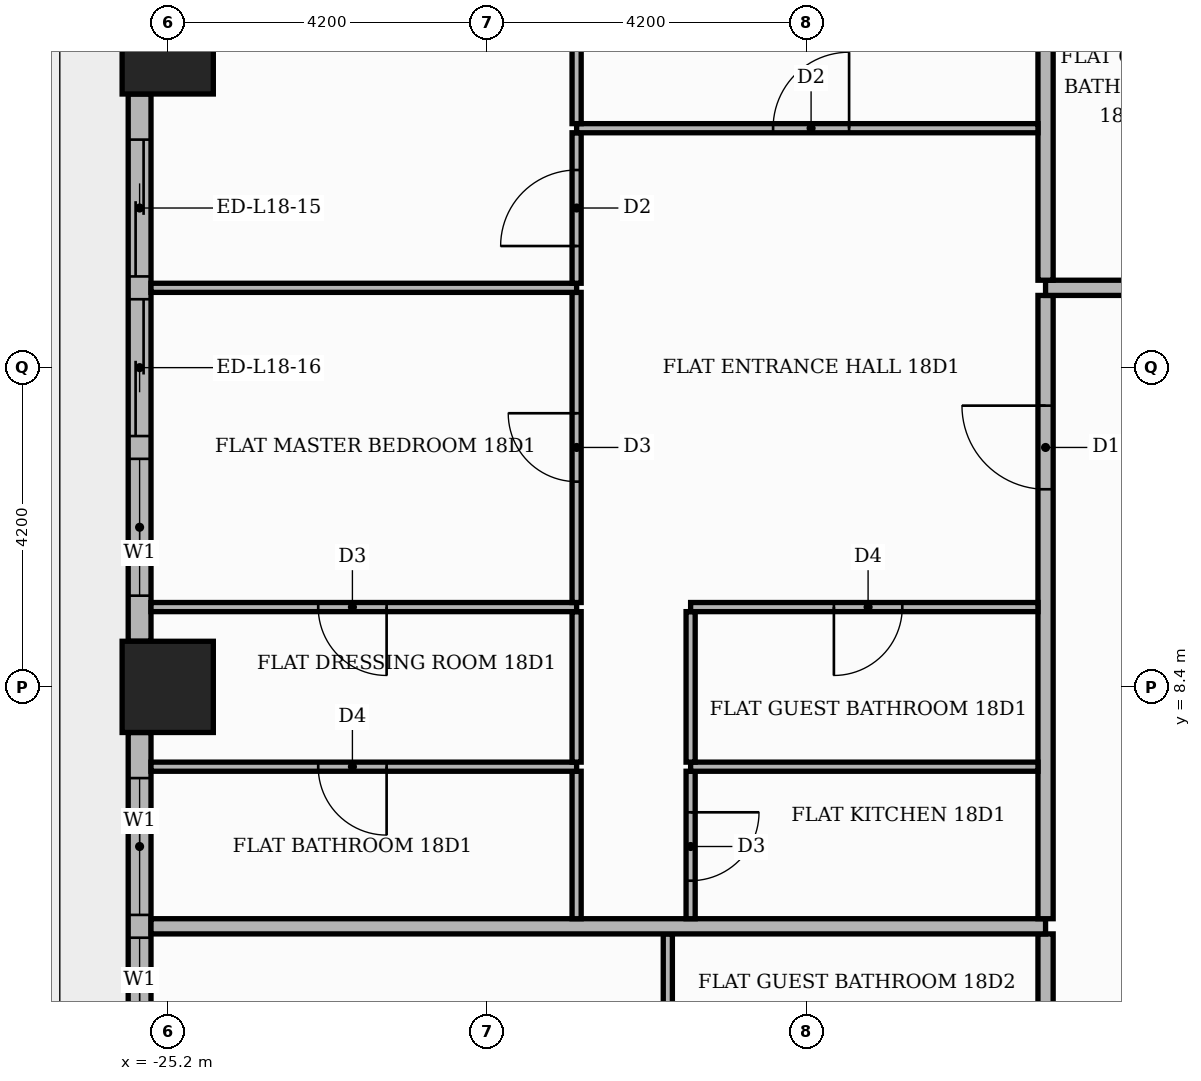
"""IFC4 building model, lengths in metres.
Left out: names, types, materials, properties, quantities, classifications, styles, units other than length and angle.
Written with IfcOpenShell. Run it as: python <this file> out.ifc"""

import sys

from ifc_helpers import new_model, si_unit, direction, frame, frame_2d, origin, origin_2d, place, context, subcontext, project, spatial, rectangle, extrude, element, fill, save


model = new_model("IFC4")
c1 = context("Model", 3, precision=1e-05, world=origin(), true_north=direction((0.0, 1.0)))
c2 = subcontext(c1, "Body", "Model", "MODEL_VIEW")
j1 = project(units=[si_unit("LENGTHUNIT", "METRE"), si_unit("PLANEANGLEUNIT", "RADIAN")], contexts=[c1])
p1 = place(None, origin())
s1 = spatial("IfcSite", under=j1, at=p1, CompositionType="ELEMENT")
p2 = place(p1, origin())
s2 = spatial("IfcBuilding", under=s1, at=p2, CompositionType="ELEMENT")
p3 = place(p2, frame((0.0, 0.0, 79.2)))
s3 = spatial("IfcBuildingStorey", under=s2, at=p3, CompositionType="ELEMENT", Elevation=79.2)
for number, where, z_axis, x_axis in (
    (1, (-25.2, 8.4, 0.0), (0.0, 0.0, 1.0), (1.0, 0.0, 0.0)),
    (2, (-25.2, 16.8, 0.0), (0.0, 0.0, 1.0), (1.0, 0.0, 0.0)),
):
    element("IfcColumn", number, at=place(p3, frame(where, z_axis=z_axis, x_axis=x_axis)), inside=s3, PredefinedType="COLUMN", context=c2, shape_type="SweptSolid", body=[
        extrude(rectangle(XDim=1.2, YDim=1.2, at=origin_2d()), origin(), (0.0, 0.0, 1.0), 3.9),
    ])
p4 = place(p3, frame((-25.57, 16.2, 0.0), z_axis=(0.0, 0.0, 1.0), x_axis=(0.0, -1.0, 0.0)))
e3 = element("IfcWall", 3, at=p4, inside=s3, PredefinedType="STANDARD", context=c2, shape_type="SweptSolid", body=[
    extrude(rectangle(XDim=7.2, YDim=0.3, at=frame_2d((3.6, 0.0))), origin(), (0.0, 0.0, 1.0), 3.48),
])
p5 = place(p4, frame((0.6, 0.0, 0.0)))
e4 = element("IfcOpeningElement", 4, at=p5, cuts=e3, PredefinedType="OPENING", context=c2, shape_type="SweptSolid", body=[
    extrude(rectangle(XDim=1.8, YDim=2.4, at=frame_2d((0.9, 1.2))), frame((0.0, 0.16, 0.0), z_axis=(0.0, -1.0, 0.0), x_axis=(1.0, 0.0, 0.0)), (0.0, 0.0, 1.0), 0.32),
])
p6 = place(p4, frame((2.7, 0.0, 0.0)))
e5 = element("IfcOpeningElement", 5, at=p6, cuts=e3, PredefinedType="OPENING", context=c2, shape_type="SweptSolid", body=[
    extrude(rectangle(XDim=1.8, YDim=2.4, at=frame_2d((0.9, 1.2))), frame((0.0, 0.16, 0.0), z_axis=(0.0, -1.0, 0.0), x_axis=(1.0, 0.0, 0.0)), (0.0, 0.0, 1.0), 0.32),
])
p7 = place(p4, frame((4.8, 0.0, 0.9)))
e6 = element("IfcOpeningElement", 6, at=p7, cuts=e3, PredefinedType="OPENING", context=c2, shape_type="SweptSolid", body=[
    extrude(rectangle(XDim=1.8, YDim=2.1, at=frame_2d((0.9, 1.05))), frame((0.0, 0.16, 0.0), z_axis=(0.0, -1.0, 0.0), x_axis=(1.0, 0.0, 0.0)), (0.0, 0.0, 1.0), 0.32),
])
p8 = place(p3, frame((-25.57, 7.8, 0.0), z_axis=(0.0, 0.0, 1.0), x_axis=(0.0, -1.0, 0.0)))
e7 = element("IfcWall", 7, at=p8, inside=s3, PredefinedType="STANDARD", context=c2, shape_type="SweptSolid", body=[
    extrude(rectangle(XDim=4.65, YDim=0.3, at=frame_2d((2.325, 0.0))), origin(), (0.0, 0.0, 1.0), 3.48),
])
p9 = place(p8, frame((0.6, 0.0, 0.9)))
e8 = element("IfcOpeningElement", 8, at=p9, cuts=e7, PredefinedType="OPENING", context=c2, shape_type="SweptSolid", body=[
    extrude(rectangle(XDim=1.8, YDim=2.1, at=frame_2d((0.9, 1.05))), frame((0.0, 0.16, 0.0), z_axis=(0.0, -1.0, 0.0), x_axis=(1.0, 0.0, 0.0)), (0.0, 0.0, 1.0), 0.32),
])
p10 = place(p8, frame((2.7, 0.0, 0.9)))
e9 = element("IfcOpeningElement", 9, at=p10, cuts=e7, PredefinedType="OPENING", context=c2, shape_type="SweptSolid", body=[
    extrude(rectangle(XDim=1.8, YDim=2.1, at=frame_2d((0.9, 1.05))), frame((0.0, 0.16, 0.0), z_axis=(0.0, -1.0, 0.0), x_axis=(1.0, 0.0, 0.0)), (0.0, 0.0, 1.0), 0.32),
])
p11 = place(p3, frame((-13.65, -13.55, 0.0), z_axis=(0.0, 0.0, 1.0), x_axis=(0.0, 1.0, 0.0)))
e10 = element("IfcWall", 10, at=p11, inside=s3, PredefinedType="PARTITIONING", context=c2, shape_type="SweptSolid", body=[
    extrude(rectangle(XDim=18.7, YDim=0.2, at=frame_2d((9.35, 0.0))), origin(), (0.0, 0.0, 1.0), 3.48),
])
p12 = place(p11, frame((14.05, 0.0, 0.0)))
e11 = element("IfcOpeningElement", 11, at=p12, cuts=e10, PredefinedType="OPENING", context=c2, shape_type="SweptSolid", body=[
    extrude(rectangle(XDim=1.1, YDim=2.4, at=frame_2d((0.55, 1.2))), frame((0.0, 0.11, 0.0), z_axis=(0.0, -1.0, 0.0), x_axis=(1.0, 0.0, 0.0)), (0.0, 0.0, 1.0), 0.22),
])
p13 = place(p3, frame((-18.62, 3.21, 0.0), z_axis=(0.0, 0.0, 1.0), x_axis=(0.0, 1.0, 0.0)))
e12 = element("IfcWall", 12, at=p13, inside=s3, PredefinedType="PARTITIONING", context=c2, shape_type="SweptSolid", body=[
    extrude(rectangle(XDim=1.94, YDim=0.12, at=frame_2d((0.97, 0.0))), origin(), (0.0, 0.0, 1.0), 3.48),
])
p14 = place(p3, frame((-25.42, 5.25, 0.0), z_axis=(0.0, 0.0, 1.0), x_axis=(1.0, 0.0, 0.0)))
e13 = element("IfcWall", 13, at=p14, inside=s3, PredefinedType="PARTITIONING", context=c2, shape_type="SweptSolid", body=[
    extrude(rectangle(XDim=11.77, YDim=0.2, at=frame_2d((5.885, 0.0))), origin(), (0.0, 0.0, 1.0), 3.48),
])
p15 = place(p3, frame((-19.82, 5.35, 0.0), z_axis=(0.0, 0.0, 1.0), x_axis=(0.0, 1.0, 0.0)))
e14 = element("IfcWall", 14, at=p15, inside=s3, PredefinedType="PARTITIONING", context=c2, shape_type="SweptSolid", body=[
    extrude(rectangle(XDim=1.94, YDim=0.12, at=frame_2d((0.97, 0.0))), origin(), (0.0, 0.0, 1.0), 3.48),
])
p16 = place(p3, frame((-18.32, 5.35, 0.0), z_axis=(0.0, 0.0, 1.0), x_axis=(0.0, 1.0, 0.0)))
e15 = element("IfcWall", 15, at=p16, inside=s3, PredefinedType="PARTITIONING", context=c2, shape_type="SweptSolid", body=[
    extrude(rectangle(XDim=1.94, YDim=0.12, at=frame_2d((0.97, 0.0))), origin(), (0.0, 0.0, 1.0), 3.48),
])
p17 = place(p16, frame((0.5, 0.0, 0.0)))
e16 = element("IfcOpeningElement", 16, at=p17, cuts=e15, PredefinedType="OPENING", context=c2, shape_type="SweptSolid", body=[
    extrude(rectangle(XDim=0.9, YDim=2.1, at=frame_2d((0.45, 1.05))), frame((0.0, 0.07, 0.0), z_axis=(0.0, -1.0, 0.0), x_axis=(1.0, 0.0, 0.0)), (0.0, 0.0, 1.0), 0.14),
])
p18 = place(p3, frame((-13.65, 5.35, 0.0), z_axis=(0.0, 0.0, 1.0), x_axis=(0.0, 1.0, 0.0)))
e17 = element("IfcWall", 17, at=p18, inside=s3, PredefinedType="PARTITIONING", context=c2, shape_type="SweptSolid", body=[
    extrude(rectangle(XDim=8.2, YDim=0.2, at=frame_2d((4.1, 0.0))), origin(), (0.0, 0.0, 1.0), 3.48),
])
p19 = place(p18, frame((5.65, 0.0, 0.0)))
e18 = element("IfcOpeningElement", 18, at=p19, cuts=e17, PredefinedType="OPENING", context=c2, shape_type="SweptSolid", body=[
    extrude(rectangle(XDim=1.1, YDim=2.4, at=frame_2d((0.55, 1.2))), frame((0.0, 0.11, 0.0), z_axis=(0.0, -1.0, 0.0), x_axis=(1.0, 0.0, 0.0)), (0.0, 0.0, 1.0), 0.22),
])
p20 = place(p3, frame((-25.42, 7.35, 0.0), z_axis=(0.0, 0.0, 1.0), x_axis=(1.0, 0.0, 0.0)))
e19 = element("IfcWall", 19, at=p20, inside=s3, PredefinedType="PARTITIONING", context=c2, shape_type="SweptSolid", body=[
    extrude(rectangle(XDim=5.6, YDim=0.12, at=frame_2d((2.8, 0.0))), origin(), (0.0, 0.0, 1.0), 3.48),
])
p21 = place(p20, frame((2.2, 0.0, 0.0)))
e20 = element("IfcOpeningElement", 20, at=p21, cuts=e19, PredefinedType="OPENING", context=c2, shape_type="SweptSolid", body=[
    extrude(rectangle(XDim=0.9, YDim=2.1, at=frame_2d((0.45, 1.05))), frame((0.0, 0.07, 0.0), z_axis=(0.0, -1.0, 0.0), x_axis=(1.0, 0.0, 0.0)), (0.0, 0.0, 1.0), 0.14),
])
p22 = place(p3, frame((-18.32, 7.35, 0.0), z_axis=(0.0, 0.0, 1.0), x_axis=(1.0, 0.0, 0.0)))
e21 = element("IfcWall", 21, at=p22, inside=s3, PredefinedType="PARTITIONING", context=c2, shape_type="SweptSolid", body=[
    extrude(rectangle(XDim=4.57, YDim=0.12, at=frame_2d((2.285, 0.0))), origin(), (0.0, 0.0, 1.0), 3.48),
])
for number, where, z_axis, x_axis in (
    (22, (-19.82, 7.41, 0.0), (0.0, 0.0, 1.0), (0.0, 1.0, 0.0)),
    (23, (-18.32, 7.41, 0.0), (0.0, 0.0, 1.0), (0.0, 1.0, 0.0)),
):
    element("IfcWall", number, at=place(p3, frame(where, z_axis=z_axis, x_axis=x_axis)), inside=s3, PredefinedType="PARTITIONING", context=c2, shape_type="SweptSolid", body=[
        extrude(rectangle(XDim=1.98, YDim=0.12, at=frame_2d((0.99, 0.0))), origin(), (0.0, 0.0, 1.0), 3.48),
    ])
p23 = place(p3, frame((-25.42, 9.45, 0.0), z_axis=(0.0, 0.0, 1.0), x_axis=(1.0, 0.0, 0.0)))
e24 = element("IfcWall", 24, at=p23, inside=s3, PredefinedType="PARTITIONING", context=c2, shape_type="SweptSolid", body=[
    extrude(rectangle(XDim=5.6, YDim=0.12, at=frame_2d((2.8, 0.0))), origin(), (0.0, 0.0, 1.0), 3.48),
])
p24 = place(p23, frame((2.2, 0.0, 0.0)))
e25 = element("IfcOpeningElement", 25, at=p24, cuts=e24, PredefinedType="OPENING", context=c2, shape_type="SweptSolid", body=[
    extrude(rectangle(XDim=0.9, YDim=2.1, at=frame_2d((0.45, 1.05))), frame((0.0, 0.07, 0.0), z_axis=(0.0, -1.0, 0.0), x_axis=(1.0, 0.0, 0.0)), (0.0, 0.0, 1.0), 0.14),
])
p25 = place(p3, frame((-18.32, 9.45, 0.0), z_axis=(0.0, 0.0, 1.0), x_axis=(1.0, 0.0, 0.0)))
e26 = element("IfcWall", 26, at=p25, inside=s3, PredefinedType="PARTITIONING", context=c2, shape_type="SweptSolid", body=[
    extrude(rectangle(XDim=4.57, YDim=0.12, at=frame_2d((2.285, 0.0))), origin(), (0.0, 0.0, 1.0), 3.48),
])
p26 = place(p25, frame((1.885, 0.0, 0.0)))
e27 = element("IfcOpeningElement", 27, at=p26, cuts=e26, PredefinedType="OPENING", context=c2, shape_type="SweptSolid", body=[
    extrude(rectangle(XDim=0.9, YDim=2.1, at=frame_2d((0.45, 1.05))), frame((0.0, 0.07, 0.0), z_axis=(0.0, -1.0, 0.0), x_axis=(1.0, 0.0, 0.0)), (0.0, 0.0, 1.0), 0.14),
])
p27 = place(p3, frame((-19.82, 9.51, 0.0), z_axis=(0.0, 0.0, 1.0), x_axis=(0.0, 1.0, 0.0)))
e28 = element("IfcWall", 28, at=p27, inside=s3, PredefinedType="PARTITIONING", context=c2, shape_type="SweptSolid", body=[
    extrude(rectangle(XDim=4.08, YDim=0.12, at=frame_2d((2.04, 0.0))), origin(), (0.0, 0.0, 1.0), 3.48),
])
p28 = place(p27, frame((1.59, 0.0, 0.0)))
e29 = element("IfcOpeningElement", 29, at=p28, cuts=e28, PredefinedType="OPENING", context=c2, shape_type="SweptSolid", body=[
    extrude(rectangle(XDim=0.9, YDim=2.1, at=frame_2d((0.45, 1.05))), frame((0.0, 0.07, 0.0), z_axis=(0.0, -1.0, 0.0), x_axis=(1.0, 0.0, 0.0)), (0.0, 0.0, 1.0), 0.14),
])
p29 = place(p3, frame((-25.42, 13.65, 0.0), z_axis=(0.0, 0.0, 1.0), x_axis=(1.0, 0.0, 0.0)))
e30 = element("IfcWall", 30, at=p29, inside=s3, PredefinedType="PARTITIONING", context=c2, shape_type="SweptSolid", body=[
    extrude(rectangle(XDim=5.6, YDim=0.12, at=frame_2d((2.8, 0.0))), origin(), (0.0, 0.0, 1.0), 3.48),
])
p30 = place(p3, frame((-13.65, 13.65, 0.0), z_axis=(0.0, 0.0, 1.0), x_axis=(1.0, 0.0, 0.0)))
e31 = element("IfcWall", 31, at=p30, inside=s3, PredefinedType="PARTITIONING", context=c2, shape_type="SweptSolid", body=[
    extrude(rectangle(XDim=39.07, YDim=0.2, at=frame_2d((19.535, 0.0))), origin(), (0.0, 0.0, 1.0), 3.48),
])
p31 = place(p30, frame((24.65, 0.0, 0.0)))
e32 = element("IfcOpeningElement", 32, at=p31, cuts=e31, PredefinedType="OPENING", context=c2, shape_type="SweptSolid", body=[
    extrude(rectangle(XDim=1.1, YDim=2.4, at=frame_2d((0.55, 1.2))), frame((0.0, 0.11, 0.0), z_axis=(0.0, -1.0, 0.0), x_axis=(1.0, 0.0, 0.0)), (0.0, 0.0, 1.0), 0.22),
])
p32 = place(p30, frame((14.15, 0.0, 0.0)))
e33 = element("IfcOpeningElement", 33, at=p32, cuts=e31, PredefinedType="OPENING", context=c2, shape_type="SweptSolid", body=[
    extrude(rectangle(XDim=1.1, YDim=2.4, at=frame_2d((0.55, 1.2))), frame((0.0, 0.11, 0.0), z_axis=(0.0, -1.0, 0.0), x_axis=(1.0, 0.0, 0.0)), (0.0, 0.0, 1.0), 0.22),
])
p33 = place(p3, frame((-19.82, 13.71, 0.0), z_axis=(0.0, 0.0, 1.0), x_axis=(0.0, 1.0, 0.0)))
e34 = element("IfcWall", 34, at=p33, inside=s3, PredefinedType="PARTITIONING", context=c2, shape_type="SweptSolid", body=[
    extrude(rectangle(XDim=1.98, YDim=0.12, at=frame_2d((0.99, 0.0))), origin(), (0.0, 0.0, 1.0), 3.48),
])
p34 = place(p33, frame((0.49, 0.0, 0.0)))
e35 = element("IfcOpeningElement", 35, at=p34, cuts=e34, PredefinedType="OPENING", context=c2, shape_type="SweptSolid", body=[
    extrude(rectangle(XDim=1.0, YDim=2.1, at=frame_2d((0.5, 1.05))), frame((0.0, 0.07, 0.0), z_axis=(0.0, -1.0, 0.0), x_axis=(1.0, 0.0, 0.0)), (0.0, 0.0, 1.0), 0.14),
])
p35 = place(p3, frame((-13.65, 13.75, 0.0), z_axis=(0.0, 0.0, 1.0), x_axis=(0.0, 1.0, 0.0)))
e36 = element("IfcWall", 36, at=p35, inside=s3, PredefinedType="PARTITIONING", context=c2, shape_type="SweptSolid", body=[
    extrude(rectangle(XDim=11.67, YDim=0.2, at=frame_2d((5.835, 0.0))), origin(), (0.0, 0.0, 1.0), 3.48),
])
p36 = place(p3, frame((-19.82, 15.75, 0.0), z_axis=(0.0, 0.0, 1.0), x_axis=(1.0, 0.0, 0.0)))
e37 = element("IfcWall", 37, at=p36, inside=s3, PredefinedType="PARTITIONING", context=c2, shape_type="SweptSolid", body=[
    extrude(rectangle(XDim=6.07, YDim=0.12, at=frame_2d((3.035, 0.0))), origin(), (0.0, 0.0, 1.0), 3.48),
])
p37 = place(p36, frame((2.585, 0.0, 0.0)))
e38 = element("IfcOpeningElement", 38, at=p37, cuts=e37, PredefinedType="OPENING", context=c2, shape_type="SweptSolid", body=[
    extrude(rectangle(XDim=1.0, YDim=2.1, at=frame_2d((0.5, 1.05))), frame((0.0, 0.07, 0.0), z_axis=(0.0, -1.0, 0.0), x_axis=(1.0, 0.0, 0.0)), (0.0, 0.0, 1.0), 0.14),
])
p38 = place(p3, frame((-19.82, 15.81, 0.0), z_axis=(0.0, 0.0, 1.0), x_axis=(0.0, 1.0, 0.0)))
e39 = element("IfcWall", 39, at=p38, inside=s3, PredefinedType="PARTITIONING", context=c2, shape_type="SweptSolid", body=[
    extrude(rectangle(XDim=1.59, YDim=0.12, at=frame_2d((0.795, 0.0))), origin(), (0.0, 0.0, 1.0), 3.48),
])
p39 = place(p5, origin())
e40 = element("IfcDoor", 40, at=p39, inside=s3, OperationType="SLIDING_TO_LEFT", PredefinedType="DOOR", context=c2, shape_type="SweptSolid", body=[
    extrude(rectangle(XDim=1.8, YDim=2.4, at=frame_2d((0.9, 1.2))), frame((0.0, 0.025, 0.0), z_axis=(0.0, -1.0, 0.0), x_axis=(1.0, 0.0, 0.0)), (0.0, 0.0, 1.0), 0.05),
])
fill(e4, e40)
p40 = place(p6, origin())
e41 = element("IfcDoor", 41, at=p40, inside=s3, OperationType="SLIDING_TO_RIGHT", PredefinedType="DOOR", context=c2, shape_type="SweptSolid", body=[
    extrude(rectangle(XDim=1.8, YDim=2.4, at=frame_2d((0.9, 1.2))), frame((0.0, 0.025, 0.0), z_axis=(0.0, -1.0, 0.0), x_axis=(1.0, 0.0, 0.0)), (0.0, 0.0, 1.0), 0.05),
])
fill(e5, e41)
p41 = place(p7, origin())
e42 = element("IfcWindow", 42, at=p41, inside=s3, PartitioningType="SINGLE_PANEL", PredefinedType="WINDOW", context=c2, shape_type="SweptSolid", body=[
    extrude(rectangle(XDim=1.8, YDim=2.1, at=frame_2d((0.9, 1.05))), frame((0.0, 0.03, 0.0), z_axis=(0.0, -1.0, 0.0), x_axis=(1.0, 0.0, 0.0)), (0.0, 0.0, 1.0), 0.06),
])
fill(e6, e42)
p42 = place(p9, origin())
e43 = element("IfcWindow", 43, at=p42, inside=s3, PartitioningType="SINGLE_PANEL", PredefinedType="WINDOW", context=c2, shape_type="SweptSolid", body=[
    extrude(rectangle(XDim=1.8, YDim=2.1, at=frame_2d((0.9, 1.05))), frame((0.0, 0.03, 0.0), z_axis=(0.0, -1.0, 0.0), x_axis=(1.0, 0.0, 0.0)), (0.0, 0.0, 1.0), 0.06),
])
fill(e8, e43)
p43 = place(p10, origin())
e44 = element("IfcWindow", 44, at=p43, inside=s3, PartitioningType="SINGLE_PANEL", PredefinedType="WINDOW", context=c2, shape_type="SweptSolid", body=[
    extrude(rectangle(XDim=1.8, YDim=2.1, at=frame_2d((0.9, 1.05))), frame((0.0, 0.03, 0.0), z_axis=(0.0, -1.0, 0.0), x_axis=(1.0, 0.0, 0.0)), (0.0, 0.0, 1.0), 0.06),
])
fill(e9, e44)
p44 = place(p19, origin())
e45 = element("IfcDoor", 45, at=p44, inside=s3, OperationType="SINGLE_SWING_RIGHT", PredefinedType="DOOR", context=c2, shape_type="SweptSolid", body=[
    extrude(rectangle(XDim=1.1, YDim=2.4, at=frame_2d((0.55, 1.2))), frame((0.0, 0.025, 0.0), z_axis=(0.0, -1.0, 0.0), x_axis=(1.0, 0.0, 0.0)), (0.0, 0.0, 1.0), 0.05),
])
fill(e18, e45)
p45 = place(p37, origin())
e46 = element("IfcDoor", 46, at=p45, inside=s3, OperationType="SINGLE_SWING_RIGHT", PredefinedType="DOOR", context=c2, shape_type="SweptSolid", body=[
    extrude(rectangle(XDim=1.0, YDim=2.1, at=frame_2d((0.5, 1.05))), frame((0.0, 0.025, 0.0), z_axis=(0.0, -1.0, 0.0), x_axis=(1.0, 0.0, 0.0)), (0.0, 0.0, 1.0), 0.05),
])
fill(e38, e46)
p46 = place(p26, frame((0.9, 0.0, 0.0), z_axis=(0.0, 0.0, 1.0), x_axis=(-1.0, 0.0, 0.0)))
e47 = element("IfcDoor", 47, at=p46, inside=s3, OperationType="SINGLE_SWING_LEFT", PredefinedType="DOOR", context=c2, shape_type="SweptSolid", body=[
    extrude(rectangle(XDim=0.9, YDim=2.1, at=frame_2d((0.45, 1.05))), frame((0.0, 0.025, 0.0), z_axis=(0.0, -1.0, 0.0), x_axis=(1.0, 0.0, 0.0)), (0.0, 0.0, 1.0), 0.05),
])
fill(e27, e47)
p47 = place(p17, frame((0.9, 0.0, 0.0), z_axis=(0.0, 0.0, 1.0), x_axis=(-1.0, 0.0, 0.0)))
e48 = element("IfcDoor", 48, at=p47, inside=s3, OperationType="SINGLE_SWING_RIGHT", PredefinedType="DOOR", context=c2, shape_type="SweptSolid", body=[
    extrude(rectangle(XDim=0.9, YDim=2.1, at=frame_2d((0.45, 1.05))), frame((0.0, 0.025, 0.0), z_axis=(0.0, -1.0, 0.0), x_axis=(1.0, 0.0, 0.0)), (0.0, 0.0, 1.0), 0.05),
])
fill(e16, e48)
p48 = place(p34, origin())
e49 = element("IfcDoor", 49, at=p48, inside=s3, OperationType="SINGLE_SWING_LEFT", PredefinedType="DOOR", context=c2, shape_type="SweptSolid", body=[
    extrude(rectangle(XDim=1.0, YDim=2.1, at=frame_2d((0.5, 1.05))), frame((0.0, 0.025, 0.0), z_axis=(0.0, -1.0, 0.0), x_axis=(1.0, 0.0, 0.0)), (0.0, 0.0, 1.0), 0.05),
])
fill(e35, e49)
p49 = place(p28, origin())
e50 = element("IfcDoor", 50, at=p49, inside=s3, OperationType="SINGLE_SWING_RIGHT", PredefinedType="DOOR", context=c2, shape_type="SweptSolid", body=[
    extrude(rectangle(XDim=0.9, YDim=2.1, at=frame_2d((0.45, 1.05))), frame((0.0, 0.025, 0.0), z_axis=(0.0, -1.0, 0.0), x_axis=(1.0, 0.0, 0.0)), (0.0, 0.0, 1.0), 0.05),
])
fill(e29, e50)
p50 = place(p24, frame((0.9, 0.0, 0.0), z_axis=(0.0, 0.0, 1.0), x_axis=(-1.0, 0.0, 0.0)))
e51 = element("IfcDoor", 51, at=p50, inside=s3, OperationType="SINGLE_SWING_RIGHT", PredefinedType="DOOR", context=c2, shape_type="SweptSolid", body=[
    extrude(rectangle(XDim=0.9, YDim=2.1, at=frame_2d((0.45, 1.05))), frame((0.0, 0.025, 0.0), z_axis=(0.0, -1.0, 0.0), x_axis=(1.0, 0.0, 0.0)), (0.0, 0.0, 1.0), 0.05),
])
fill(e25, e51)
p51 = place(p21, frame((0.9, 0.0, 0.0), z_axis=(0.0, 0.0, 1.0), x_axis=(-1.0, 0.0, 0.0)))
e52 = element("IfcDoor", 52, at=p51, inside=s3, OperationType="SINGLE_SWING_RIGHT", PredefinedType="DOOR", context=c2, shape_type="SweptSolid", body=[
    extrude(rectangle(XDim=0.9, YDim=2.1, at=frame_2d((0.45, 1.05))), frame((0.0, 0.025, 0.0), z_axis=(0.0, -1.0, 0.0), x_axis=(1.0, 0.0, 0.0)), (0.0, 0.0, 1.0), 0.05),
])
fill(e20, e52)
save(model, sys.argv[1])
